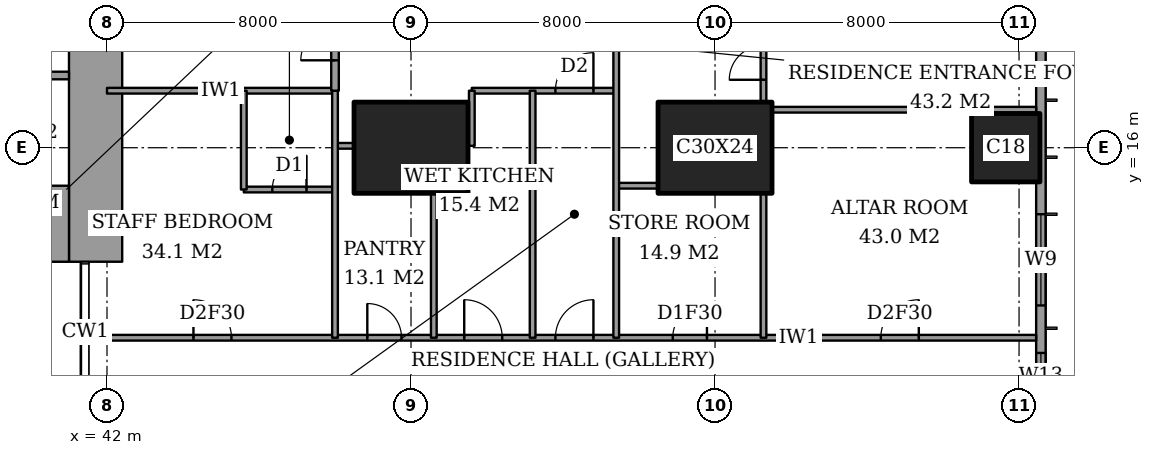
"""IFC4 building model, lengths in metres.
Left out: names, types, materials, properties, quantities, classifications, styles, units other than length and angle.
Written with IfcOpenShell. Run it as: python <this file> out.ifc"""

import sys

from ifc_helpers import new_model, si_unit, direction, frame, frame_2d, origin, origin_2d, place, context, subcontext, project, spatial, rectangle, extrude, element, fill, save


model = new_model("IFC4")
c1 = context("Model", 3, precision=1e-05, world=origin(), true_north=direction((0.0, 1.0)))
c2 = subcontext(c1, "Body", "Model", "MODEL_VIEW")
j1 = project(units=[si_unit("LENGTHUNIT", "METRE"), si_unit("PLANEANGLEUNIT", "RADIAN")], contexts=[c1])
p1 = place(None, origin())
s1 = spatial("IfcSite", under=j1, at=p1, CompositionType="ELEMENT")
p2 = place(p1, origin())
s2 = spatial("IfcBuilding", under=s1, at=p2, CompositionType="ELEMENT")
p3 = place(p2, frame((0.0, 0.0, 221.8)))
s3 = spatial("IfcBuildingStorey", under=s2, at=p3, CompositionType="ELEMENT", Elevation=221.8)
for number, where, z_axis, x_axis in (
    (1, (50.0, 16.0, 0.0), (0.0, 0.0, 1.0), (1.0, 0.0, 0.0)),
    (2, (58.0, 16.0, 0.0), (0.0, 0.0, 1.0), (1.0, 0.0, 0.0)),
):
    element("IfcColumn", number, at=place(p3, frame(where, z_axis=z_axis, x_axis=x_axis)), inside=s3, PredefinedType="COLUMN", context=c2, shape_type="SweptSolid", body=[
        extrude(rectangle(XDim=3.0, YDim=2.4, at=origin_2d()), origin(), (0.0, 0.0, 1.0), 3.6),
    ])
p4 = place(p3, frame((65.65, 16.0, 0.0), z_axis=(0.0, 0.0, 1.0), x_axis=(1.0, 0.0, 0.0)))
e3 = element("IfcColumn", 3, at=p4, inside=s3, PredefinedType="COLUMN", context=c2, shape_type="SweptSolid", body=[
    extrude(rectangle(XDim=1.8, YDim=1.8, at=origin_2d()), origin(), (0.0, 0.0, 1.0), 3.6),
])
p5 = place(p3, frame((37.85, 14.0, 0.0), z_axis=(0.0, 0.0, 1.0), x_axis=(1.0, 0.0, 0.0)))
e4 = element("IfcWall", 4, at=p5, inside=s3, PredefinedType="SHEAR", context=c2, shape_type="SweptSolid", body=[
    extrude(rectangle(XDim=3.15, YDim=2.0, at=frame_2d((1.575, 0.0))), origin(), (0.0, 0.0, 1.0), 3.6),
])
p6 = place(p3, frame((41.7, 13.0, 0.0), z_axis=(0.0, 0.0, 1.0), x_axis=(0.0, 1.0, 0.0)))
e5 = element("IfcWall", 5, at=p6, inside=s3, PredefinedType="SHEAR", context=c2, shape_type="SweptSolid", body=[
    extrude(rectangle(XDim=11.85, YDim=1.4, at=frame_2d((5.925, 0.0))), origin(), (0.0, 0.0, 1.0), 3.6),
])
p7 = place(p6, frame((7.5, 0.0, 0.0)))
e6 = element("IfcOpeningElement", 6, at=p7, cuts=e5, PredefinedType="OPENING", context=c2, shape_type="SweptSolid", body=[
    extrude(rectangle(XDim=1.8, YDim=2.4, at=frame_2d((0.9, 1.2))), frame((0.0, 0.71, 0.0), z_axis=(0.0, -1.0, 0.0), x_axis=(1.0, 0.0, 0.0)), (0.0, 0.0, 1.0), 1.42),
])
p8 = place(p3, frame((66.575, 3.175, 0.0), z_axis=(0.0, 0.0, 1.0), x_axis=(0.0, 1.0, 0.0)))
e7 = element("IfcWall", 7, at=p8, inside=s3, PredefinedType="SOLIDWALL", context=c2, shape_type="SweptSolid", body=[
    extrude(rectangle(XDim=41.65, YDim=0.25, at=frame_2d((20.825, 0.0))), origin(), (0.0, 0.0, 1.0), 3.6),
])
p9 = place(p8, frame((0.825, 0.0, 0.2)))
e8 = element("IfcOpeningElement", 8, at=p9, cuts=e7, PredefinedType="OPENING", context=c2, shape_type="SweptSolid", body=[
    extrude(rectangle(XDim=2.4, YDim=2.4, at=frame_2d((1.2, 1.2))), frame((0.0, 0.135, 0.0), z_axis=(0.0, -1.0, 0.0), x_axis=(1.0, 0.0, 0.0)), (0.0, 0.0, 1.0), 0.27),
])
p10 = place(p8, frame((6.225, 0.0, 0.2)))
e9 = element("IfcOpeningElement", 9, at=p10, cuts=e7, PredefinedType="OPENING", context=c2, shape_type="SweptSolid", body=[
    extrude(rectangle(XDim=1.2, YDim=2.4, at=frame_2d((0.6, 1.2))), frame((0.0, 0.135, 0.0), z_axis=(0.0, -1.0, 0.0), x_axis=(1.0, 0.0, 0.0)), (0.0, 0.0, 1.0), 0.27),
])
p11 = place(p8, frame((8.675, 0.0, 0.2)))
e10 = element("IfcOpeningElement", 10, at=p11, cuts=e7, PredefinedType="OPENING", context=c2, shape_type="SweptSolid", body=[
    extrude(rectangle(XDim=2.4, YDim=2.4, at=frame_2d((1.2, 1.2))), frame((0.0, 0.135, 0.0), z_axis=(0.0, -1.0, 0.0), x_axis=(1.0, 0.0, 0.0)), (0.0, 0.0, 1.0), 0.27),
])
p12 = place(p8, frame((15.675, 0.0, 0.2)))
e11 = element("IfcOpeningElement", 11, at=p12, cuts=e7, PredefinedType="OPENING", context=c2, shape_type="SweptSolid", body=[
    extrude(rectangle(XDim=2.4, YDim=2.4, at=frame_2d((1.2, 1.2))), frame((0.0, 0.135, 0.0), z_axis=(0.0, -1.0, 0.0), x_axis=(1.0, 0.0, 0.0)), (0.0, 0.0, 1.0), 0.27),
])
p13 = place(p8, frame((23.575, 0.0, 0.2)))
e12 = element("IfcOpeningElement", 12, at=p13, cuts=e7, PredefinedType="OPENING", context=c2, shape_type="SweptSolid", body=[
    extrude(rectangle(XDim=2.4, YDim=2.4, at=frame_2d((1.2, 1.2))), frame((0.0, 0.135, 0.0), z_axis=(0.0, -1.0, 0.0), x_axis=(1.0, 0.0, 0.0)), (0.0, 0.0, 1.0), 0.27),
])
p14 = place(p8, frame((30.775, 0.0, 0.2)))
e13 = element("IfcOpeningElement", 13, at=p14, cuts=e7, PredefinedType="OPENING", context=c2, shape_type="SweptSolid", body=[
    extrude(rectangle(XDim=2.4, YDim=2.4, at=frame_2d((1.2, 1.2))), frame((0.0, 0.135, 0.0), z_axis=(0.0, -1.0, 0.0), x_axis=(1.0, 0.0, 0.0)), (0.0, 0.0, 1.0), 0.27),
])
p15 = place(p8, frame((34.55, 0.0, 0.2)))
e14 = element("IfcOpeningElement", 14, at=p15, cuts=e7, PredefinedType="OPENING", context=c2, shape_type="SweptSolid", body=[
    extrude(rectangle(XDim=1.2, YDim=2.4, at=frame_2d((0.6, 1.2))), frame((0.0, 0.135, 0.0), z_axis=(0.0, -1.0, 0.0), x_axis=(1.0, 0.0, 0.0)), (0.0, 0.0, 1.0), 0.27),
])
p16 = place(p8, frame((38.425, 0.0, 0.2)))
e15 = element("IfcOpeningElement", 15, at=p16, cuts=e7, PredefinedType="OPENING", context=c2, shape_type="SweptSolid", body=[
    extrude(rectangle(XDim=2.4, YDim=2.4, at=frame_2d((1.2, 1.2))), frame((0.0, 0.135, 0.0), z_axis=(0.0, -1.0, 0.0), x_axis=(1.0, 0.0, 0.0)), (0.0, 0.0, 1.0), 0.27),
])
p17 = place(p3, frame((41.439, 11.0, 0.0), z_axis=(0.0, 0.0, 1.0), x_axis=(1.0, 0.0, 0.0)))
e16 = element("IfcWall", 16, at=p17, inside=s3, PredefinedType="PARTITIONING", context=c2, shape_type="SweptSolid", body=[
    extrude(rectangle(XDim=25.011, YDim=0.15, at=frame_2d((12.505, 0.0))), origin(), (0.0, 0.0, 1.0), 3.25),
])
p18 = place(p17, frame((12.361, 0.0, 0.0)))
e17 = element("IfcOpeningElement", 17, at=p18, cuts=e16, PredefinedType="OPENING", context=c2, shape_type="SweptSolid", body=[
    extrude(rectangle(XDim=1.0, YDim=2.1, at=frame_2d((0.5, 1.05))), frame((0.0, 0.085, 0.0), z_axis=(0.0, -1.0, 0.0), x_axis=(1.0, 0.0, 0.0)), (0.0, 0.0, 1.0), 0.17),
])
p19 = place(p17, frame((20.924, 0.0, 0.0)))
e18 = element("IfcOpeningElement", 18, at=p19, cuts=e16, PredefinedType="OPENING", context=c2, shape_type="SweptSolid", body=[
    extrude(rectangle(XDim=1.0, YDim=2.1, at=frame_2d((0.5, 1.05))), frame((0.0, 0.085, 0.0), z_axis=(0.0, -1.0, 0.0), x_axis=(1.0, 0.0, 0.0)), (0.0, 0.0, 1.0), 0.17),
])
p20 = place(p17, frame((15.448, 0.0, 0.0)))
e19 = element("IfcOpeningElement", 19, at=p20, cuts=e16, PredefinedType="OPENING", context=c2, shape_type="SweptSolid", body=[
    extrude(rectangle(XDim=0.9, YDim=2.1, at=frame_2d((0.45, 1.05))), frame((0.0, 0.085, 0.0), z_axis=(0.0, -1.0, 0.0), x_axis=(1.0, 0.0, 0.0)), (0.0, 0.0, 1.0), 0.17),
])
p21 = place(p17, frame((9.961, 0.0, 0.0)))
e20 = element("IfcOpeningElement", 20, at=p21, cuts=e16, PredefinedType="OPENING", context=c2, shape_type="SweptSolid", body=[
    extrude(rectangle(XDim=1.0, YDim=2.1, at=frame_2d((0.5, 1.05))), frame((0.0, 0.085, 0.0), z_axis=(0.0, -1.0, 0.0), x_axis=(1.0, 0.0, 0.0)), (0.0, 0.0, 1.0), 0.17),
])
p22 = place(p17, frame((7.411, 0.0, 0.0)))
e21 = element("IfcOpeningElement", 21, at=p22, cuts=e16, PredefinedType="OPENING", context=c2, shape_type="SweptSolid", body=[
    extrude(rectangle(XDim=0.9, YDim=2.1, at=frame_2d((0.45, 1.05))), frame((0.0, 0.085, 0.0), z_axis=(0.0, -1.0, 0.0), x_axis=(1.0, 0.0, 0.0)), (0.0, 0.0, 1.0), 0.17),
])
p23 = place(p17, frame((2.836, 0.0, 0.0)))
e22 = element("IfcOpeningElement", 22, at=p23, cuts=e16, PredefinedType="OPENING", context=c2, shape_type="SweptSolid", body=[
    extrude(rectangle(XDim=1.0, YDim=2.1, at=frame_2d((0.5, 1.05))), frame((0.0, 0.085, 0.0), z_axis=(0.0, -1.0, 0.0), x_axis=(1.0, 0.0, 0.0)), (0.0, 0.0, 1.0), 0.17),
])
p24 = place(p3, frame((45.6, 14.9, 0.0), z_axis=(0.0, 0.0, 1.0), x_axis=(1.0, 0.0, 0.0)))
e23 = element("IfcWall", 23, at=p24, inside=s3, PredefinedType="PARTITIONING", context=c2, shape_type="SweptSolid", body=[
    extrude(rectangle(XDim=2.4, YDim=0.15, at=frame_2d((1.2, 0.0))), origin(), (0.0, 0.0, 1.0), 3.25),
])
p25 = place(p24, frame((0.75, 0.0, 0.0)))
e24 = element("IfcOpeningElement", 24, at=p25, cuts=e23, PredefinedType="OPENING", context=c2, shape_type="SweptSolid", body=[
    extrude(rectangle(XDim=0.9, YDim=2.1, at=frame_2d((0.45, 1.05))), frame((0.0, 0.085, 0.0), z_axis=(0.0, -1.0, 0.0), x_axis=(1.0, 0.0, 0.0)), (0.0, 0.0, 1.0), 0.17),
])
p26 = place(p3, frame((55.4, 15.0, 0.0), z_axis=(0.0, 0.0, 1.0), x_axis=(1.0, 0.0, 0.0)))
e25 = element("IfcWall", 25, at=p26, inside=s3, PredefinedType="PARTITIONING", context=c2, shape_type="SweptSolid", body=[
    extrude(rectangle(XDim=1.1, YDim=0.15, at=frame_2d((0.55, 0.0))), origin(), (0.0, 0.0, 1.0), 3.25),
])
p27 = place(p3, frame((48.0, 16.05, 0.0), z_axis=(0.0, 0.0, 1.0), x_axis=(1.0, 0.0, 0.0)))
e26 = element("IfcWall", 26, at=p27, inside=s3, PredefinedType="PARTITIONING", context=c2, shape_type="SweptSolid", body=[
    extrude(rectangle(XDim=0.5, YDim=0.15, at=frame_2d((0.25, 0.0))), origin(), (0.0, 0.0, 1.0), 3.25),
])
p28 = place(p3, frame((59.5, 17.0, 0.0), z_axis=(0.0, 0.0, 1.0), x_axis=(1.0, 0.0, 0.0)))
e27 = element("IfcWall", 27, at=p28, inside=s3, PredefinedType="PARTITIONING", context=c2, shape_type="SweptSolid", body=[
    extrude(rectangle(XDim=6.95, YDim=0.15, at=frame_2d((3.475, 0.0))), origin(), (0.0, 0.0, 1.0), 3.25),
])
p29 = place(p3, frame((42.0, 17.5, 0.0), z_axis=(0.0, 0.0, 1.0), x_axis=(1.0, 0.0, 0.0)))
e28 = element("IfcWall", 28, at=p29, inside=s3, PredefinedType="PARTITIONING", context=c2, shape_type="SweptSolid", body=[
    extrude(rectangle(XDim=6.0, YDim=0.15, at=frame_2d((3.0, 0.0))), origin(), (0.0, 0.0, 1.0), 3.25),
])
p30 = place(p3, frame((51.6, 17.5, 0.0), z_axis=(0.0, 0.0, 1.0), x_axis=(1.0, 0.0, 0.0)))
e29 = element("IfcWall", 29, at=p30, inside=s3, PredefinedType="PARTITIONING", context=c2, shape_type="SweptSolid", body=[
    extrude(rectangle(XDim=3.8, YDim=0.15, at=frame_2d((1.9, 0.0))), origin(), (0.0, 0.0, 1.0), 3.25),
])
p31 = place(p30, frame((2.2, 0.0, 0.0)))
e30 = element("IfcOpeningElement", 30, at=p31, cuts=e29, PredefinedType="OPENING", context=c2, shape_type="SweptSolid", body=[
    extrude(rectangle(XDim=1.0, YDim=2.1, at=frame_2d((0.5, 1.05))), frame((0.0, 0.085, 0.0), z_axis=(0.0, -1.0, 0.0), x_axis=(1.0, 0.0, 0.0)), (0.0, 0.0, 1.0), 0.17),
])
p32 = place(p3, frame((45.6, 14.9, 0.0), z_axis=(0.0, 0.0, 1.0), x_axis=(0.0, 1.0, 0.0)))
e31 = element("IfcWall", 31, at=p32, inside=s3, PredefinedType="PARTITIONING", context=c2, shape_type="SweptSolid", body=[
    extrude(rectangle(XDim=2.6, YDim=0.15, at=frame_2d((1.3, 0.0))), origin(), (0.0, 0.0, 1.0), 3.25),
])
p33 = place(p3, frame((48.0, 17.5, 0.0), z_axis=(0.0, 0.0, 1.0), x_axis=(0.0, 1.0, 0.0)))
e32 = element("IfcWall", 32, at=p33, inside=s3, PredefinedType="PARTITIONING", context=c2, shape_type="SweptSolid", body=[
    extrude(rectangle(XDim=6.5, YDim=0.2, at=frame_2d((3.25, 0.0))), origin(), (0.0, 0.0, 1.0), 3.25),
])
p34 = place(p33, frame((3.9, 0.0, 0.0)))
e33 = element("IfcOpeningElement", 33, at=p34, cuts=e32, PredefinedType="OPENING", context=c2, shape_type="SweptSolid", body=[
    extrude(rectangle(XDim=1.2, YDim=2.4, at=frame_2d((0.6, 1.2))), frame((0.0, 0.11, 0.0), z_axis=(0.0, -1.0, 0.0), x_axis=(1.0, 0.0, 0.0)), (0.0, 0.0, 1.0), 0.22),
])
p35 = place(p33, frame((0.8, 0.0, 0.0)))
e34 = element("IfcOpeningElement", 34, at=p35, cuts=e32, PredefinedType="OPENING", context=c2, shape_type="SweptSolid", body=[
    extrude(rectangle(XDim=0.9, YDim=2.1, at=frame_2d((0.45, 1.05))), frame((0.0, 0.11, 0.0), z_axis=(0.0, -1.0, 0.0), x_axis=(1.0, 0.0, 0.0)), (0.0, 0.0, 1.0), 0.22),
])
p36 = place(p3, frame((48.0, 11.0, 0.0), z_axis=(0.0, 0.0, 1.0), x_axis=(0.0, 1.0, 0.0)))
e35 = element("IfcWall", 35, at=p36, inside=s3, PredefinedType="PARTITIONING", context=c2, shape_type="SweptSolid", body=[
    extrude(rectangle(XDim=6.5, YDim=0.15, at=frame_2d((3.25, 0.0))), origin(), (0.0, 0.0, 1.0), 3.25),
])
p37 = place(p3, frame((50.6, 11.0, 0.0), z_axis=(0.0, 0.0, 1.0), x_axis=(0.0, 1.0, 0.0)))
e36 = element("IfcWall", 36, at=p37, inside=s3, PredefinedType="PARTITIONING", context=c2, shape_type="SweptSolid", body=[
    extrude(rectangle(XDim=3.8, YDim=0.15, at=frame_2d((1.9, 0.0))), origin(), (0.0, 0.0, 1.0), 3.25),
])
p38 = place(p3, frame((51.6, 16.05, 0.0), z_axis=(0.0, 0.0, 1.0), x_axis=(0.0, 1.0, 0.0)))
e37 = element("IfcWall", 37, at=p38, inside=s3, PredefinedType="PARTITIONING", context=c2, shape_type="SweptSolid", body=[
    extrude(rectangle(XDim=1.45, YDim=0.15, at=frame_2d((0.725, 0.0))), origin(), (0.0, 0.0, 1.0), 3.25),
])
p39 = place(p3, frame((53.2, 11.0, 0.0), z_axis=(0.0, 0.0, 1.0), x_axis=(0.0, 1.0, 0.0)))
e38 = element("IfcWall", 38, at=p39, inside=s3, PredefinedType="PARTITIONING", context=c2, shape_type="SweptSolid", body=[
    extrude(rectangle(XDim=6.5, YDim=0.15, at=frame_2d((3.25, 0.0))), origin(), (0.0, 0.0, 1.0), 3.25),
])
p40 = place(p3, frame((55.4, 11.0, 0.0), z_axis=(0.0, 0.0, 1.0), x_axis=(0.0, 1.0, 0.0)))
e39 = element("IfcWall", 39, at=p40, inside=s3, PredefinedType="PARTITIONING", context=c2, shape_type="SweptSolid", body=[
    extrude(rectangle(XDim=10.6, YDim=0.15, at=frame_2d((5.3, 0.0))), origin(), (0.0, 0.0, 1.0), 3.25),
])
p41 = place(p40, frame((8.05, 0.0, 0.0)))
e40 = element("IfcOpeningElement", 40, at=p41, cuts=e39, PredefinedType="OPENING", context=c2, shape_type="SweptSolid", body=[
    extrude(rectangle(XDim=1.0, YDim=2.1, at=frame_2d((0.5, 1.05))), frame((0.0, 0.085, 0.0), z_axis=(0.0, -1.0, 0.0), x_axis=(1.0, 0.0, 0.0)), (0.0, 0.0, 1.0), 0.17),
])
p42 = place(p3, frame((59.275, 11.0, 0.0), z_axis=(0.0, 0.0, 1.0), x_axis=(0.0, 1.0, 0.0)))
e41 = element("IfcWall", 41, at=p42, inside=s3, PredefinedType="PARTITIONING", context=c2, shape_type="SweptSolid", body=[
    extrude(rectangle(XDim=3.8, YDim=0.15, at=frame_2d((1.9, 0.0))), origin(), (0.0, 0.0, 1.0), 3.25),
])
p43 = place(p3, frame((59.275, 17.2, 0.0), z_axis=(0.0, 0.0, 1.0), x_axis=(0.0, 1.0, 0.0)))
e42 = element("IfcWall", 42, at=p43, inside=s3, PredefinedType="PARTITIONING", context=c2, shape_type="SweptSolid", body=[
    extrude(rectangle(XDim=2.45, YDim=0.15, at=frame_2d((1.225, 0.0))), origin(), (0.0, 0.0, 1.0), 3.25),
])
p44 = place(p43, frame((0.587, 0.0, 0.0)))
e43 = element("IfcOpeningElement", 43, at=p44, cuts=e42, PredefinedType="OPENING", context=c2, shape_type="SweptSolid", body=[
    extrude(rectangle(XDim=0.9, YDim=2.1, at=frame_2d((0.45, 1.05))), frame((0.0, 0.085, 0.0), z_axis=(0.0, -1.0, 0.0), x_axis=(1.0, 0.0, 0.0)), (0.0, 0.0, 1.0), 0.17),
])
p45 = place(p3, frame((28.3, 17.9, 0.0), z_axis=(0.0, 0.0, 1.0), x_axis=(1.0, 0.0, 0.0)))
e44 = element("IfcWall", 44, at=p45, inside=s3, PredefinedType="PARTITIONING", context=c2, shape_type="SweptSolid", body=[
    extrude(rectangle(XDim=12.7, YDim=0.2, at=frame_2d((6.35, 0.0))), origin(), (0.0, 0.0, 1.0), 3.6),
])
p46 = place(p45, frame((1.05, 0.0, 0.0)))
e45 = element("IfcOpeningElement", 45, at=p46, cuts=e44, PredefinedType="OPENING", context=c2, shape_type="SweptSolid", body=[
    extrude(rectangle(XDim=0.9, YDim=2.1, at=frame_2d((0.45, 1.05))), frame((0.0, 0.11, 0.0), z_axis=(0.0, -1.0, 0.0), x_axis=(1.0, 0.0, 0.0)), (0.0, 0.0, 1.0), 0.22),
])
p47 = place(p45, frame((10.6, 0.0, 0.0)))
e46 = element("IfcOpeningElement", 46, at=p47, cuts=e44, PredefinedType="OPENING", context=c2, shape_type="SweptSolid", body=[
    extrude(rectangle(XDim=1.2, YDim=2.1, at=frame_2d((0.6, 1.05))), frame((0.0, 0.11, 0.0), z_axis=(0.0, -1.0, 0.0), x_axis=(1.0, 0.0, 0.0)), (0.0, 0.0, 1.0), 0.22),
])
p48 = place(p10, origin())
e47 = element("IfcWindow", 47, at=p48, inside=s3, PartitioningType="SINGLE_PANEL", PredefinedType="WINDOW", context=c2, shape_type="SweptSolid", body=[
    extrude(rectangle(XDim=1.2, YDim=2.4, at=frame_2d((0.6, 1.2))), frame((0.0, 0.03, 0.0), z_axis=(0.0, -1.0, 0.0), x_axis=(1.0, 0.0, 0.0)), (0.0, 0.0, 1.0), 0.06),
])
fill(e9, e47)
p49 = place(p11, origin())
e48 = element("IfcWindow", 48, at=p49, inside=s3, PartitioningType="SINGLE_PANEL", PredefinedType="WINDOW", context=c2, shape_type="SweptSolid", body=[
    extrude(rectangle(XDim=2.4, YDim=2.4, at=frame_2d((1.2, 1.2))), frame((0.0, 0.03, 0.0), z_axis=(0.0, -1.0, 0.0), x_axis=(1.0, 0.0, 0.0)), (0.0, 0.0, 1.0), 0.06),
])
fill(e10, e48)
p50 = place(p18, origin())
e49 = element("IfcDoor", 49, at=p50, inside=s3, OperationType="SINGLE_SWING_LEFT", PredefinedType="DOOR", context=c2, shape_type="SweptSolid", body=[
    extrude(rectangle(XDim=1.0, YDim=2.1, at=frame_2d((0.5, 1.05))), frame((0.0, 0.025, 0.0), z_axis=(0.0, -1.0, 0.0), x_axis=(1.0, 0.0, 0.0)), (0.0, 0.0, 1.0), 0.05),
])
fill(e17, e49)
p51 = place(p19, origin())
e50 = element("IfcDoor", 50, at=p51, inside=s3, OperationType="SINGLE_SWING_LEFT", PredefinedType="DOOR", context=c2, shape_type="SweptSolid", body=[
    extrude(rectangle(XDim=1.0, YDim=2.1, at=frame_2d((0.5, 1.05))), frame((0.0, 0.025, 0.0), z_axis=(0.0, -1.0, 0.0), x_axis=(1.0, 0.0, 0.0)), (0.0, 0.0, 1.0), 0.05),
])
fill(e18, e50)
p52 = place(p44, origin())
e51 = element("IfcDoor", 51, at=p52, inside=s3, OperationType="SINGLE_SWING_RIGHT", PredefinedType="DOOR", context=c2, shape_type="SweptSolid", body=[
    extrude(rectangle(XDim=0.9, YDim=2.1, at=frame_2d((0.45, 1.05))), frame((0.0, 0.025, 0.0), z_axis=(0.0, -1.0, 0.0), x_axis=(1.0, 0.0, 0.0)), (0.0, 0.0, 1.0), 0.05),
])
fill(e43, e51)
p53 = place(p20, origin())
e52 = element("IfcDoor", 52, at=p53, inside=s3, OperationType="SINGLE_SWING_LEFT", PredefinedType="DOOR", context=c2, shape_type="SweptSolid", body=[
    extrude(rectangle(XDim=0.9, YDim=2.1, at=frame_2d((0.45, 1.05))), frame((0.0, 0.025, 0.0), z_axis=(0.0, -1.0, 0.0), x_axis=(1.0, 0.0, 0.0)), (0.0, 0.0, 1.0), 0.05),
])
fill(e19, e52)
p54 = place(p31, origin())
e53 = element("IfcDoor", 53, at=p54, inside=s3, OperationType="SINGLE_SWING_LEFT", PredefinedType="DOOR", context=c2, shape_type="SweptSolid", body=[
    extrude(rectangle(XDim=1.0, YDim=2.1, at=frame_2d((0.5, 1.05))), frame((0.0, 0.025, 0.0), z_axis=(0.0, -1.0, 0.0), x_axis=(1.0, 0.0, 0.0)), (0.0, 0.0, 1.0), 0.05),
])
fill(e30, e53)
p55 = place(p21, origin())
e54 = element("IfcDoor", 54, at=p55, inside=s3, OperationType="SINGLE_SWING_RIGHT", PredefinedType="DOOR", context=c2, shape_type="SweptSolid", body=[
    extrude(rectangle(XDim=1.0, YDim=2.1, at=frame_2d((0.5, 1.05))), frame((0.0, 0.025, 0.0), z_axis=(0.0, -1.0, 0.0), x_axis=(1.0, 0.0, 0.0)), (0.0, 0.0, 1.0), 0.05),
])
fill(e20, e54)
p56 = place(p22, origin())
e55 = element("IfcDoor", 55, at=p56, inside=s3, OperationType="SINGLE_SWING_RIGHT", PredefinedType="DOOR", context=c2, shape_type="SweptSolid", body=[
    extrude(rectangle(XDim=0.9, YDim=2.1, at=frame_2d((0.45, 1.05))), frame((0.0, 0.025, 0.0), z_axis=(0.0, -1.0, 0.0), x_axis=(1.0, 0.0, 0.0)), (0.0, 0.0, 1.0), 0.05),
])
fill(e21, e55)
p57 = place(p25, origin())
e56 = element("IfcDoor", 56, at=p57, inside=s3, OperationType="SINGLE_SWING_LEFT", PredefinedType="DOOR", context=c2, shape_type="SweptSolid", body=[
    extrude(rectangle(XDim=0.9, YDim=2.1, at=frame_2d((0.45, 1.05))), frame((0.0, 0.025, 0.0), z_axis=(0.0, -1.0, 0.0), x_axis=(1.0, 0.0, 0.0)), (0.0, 0.0, 1.0), 0.05),
])
fill(e24, e56)
p58 = place(p23, origin())
e57 = element("IfcDoor", 57, at=p58, inside=s3, OperationType="SINGLE_SWING_RIGHT", PredefinedType="DOOR", context=c2, shape_type="SweptSolid", body=[
    extrude(rectangle(XDim=1.0, YDim=2.1, at=frame_2d((0.5, 1.05))), frame((0.0, 0.025, 0.0), z_axis=(0.0, -1.0, 0.0), x_axis=(1.0, 0.0, 0.0)), (0.0, 0.0, 1.0), 0.05),
])
fill(e22, e57)
p59 = place(p35, origin())
e58 = element("IfcDoor", 58, at=p59, inside=s3, OperationType="SINGLE_SWING_RIGHT", PredefinedType="DOOR", context=c2, shape_type="SweptSolid", body=[
    extrude(rectangle(XDim=0.9, YDim=2.1, at=frame_2d((0.45, 1.05))), frame((0.0, 0.025, 0.0), z_axis=(0.0, -1.0, 0.0), x_axis=(1.0, 0.0, 0.0)), (0.0, 0.0, 1.0), 0.05),
])
fill(e34, e58)
save(model, sys.argv[1])
